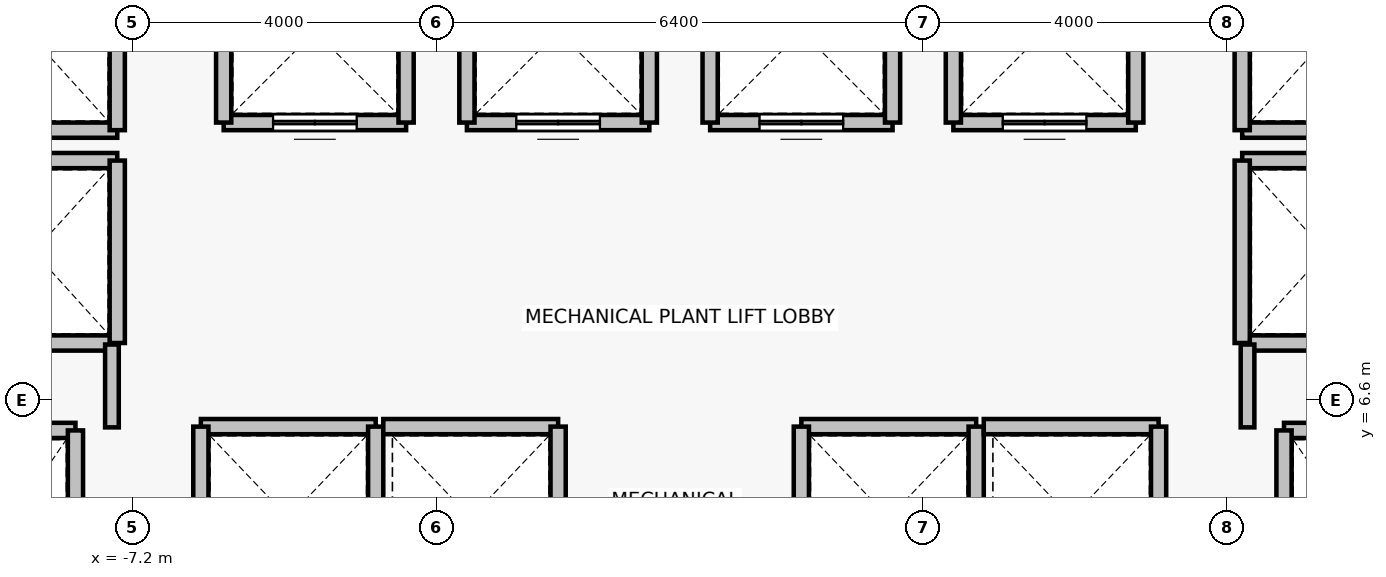
"""IFC4 building model, lengths in metres.
Left out: names, types, materials, properties, quantities, classifications, styles, units other than length and angle.
Written with IfcOpenShell. Run it as: python <this file> out.ifc"""

import sys

from ifc_helpers import new_model, si_unit, direction, frame, frame_2d, origin, place, context, subcontext, project, spatial, rectangle, extrude, source, transform, mapped, element, fill, save


model = new_model("IFC4")
c1 = context("Model", 3, precision=1e-05, world=origin(), true_north=direction((0.0, 1.0)))
c2 = subcontext(c1, "Body", "Model", "MODEL_VIEW")
j1 = project(units=[si_unit("LENGTHUNIT", "METRE"), si_unit("PLANEANGLEUNIT", "RADIAN")], contexts=[c1])
p1 = place(None, origin())
s1 = spatial("IfcSite", under=j1, at=p1, CompositionType="ELEMENT")
p2 = place(p1, origin())
s2 = spatial("IfcBuilding", under=s1, at=p2, CompositionType="ELEMENT")
p3 = place(p2, frame((0.0, 0.0, 80.2)))
s3 = spatial("IfcBuildingStorey", under=s2, at=p3, CompositionType="ELEMENT", Elevation=80.2)
p4 = place(p3, frame((-9.95, 6.2, 0.0), z_axis=(0.0, 0.0, 1.0), x_axis=(1.0, 0.0, 0.0)))
e1 = element("IfcWall", 1, at=p4, inside=s3, PredefinedType="SOLIDWALL", context=c2, shape_type="SweptSolid", body=[
    extrude(rectangle(XDim=2.0, YDim=0.2, at=frame_2d((1.0, 0.0))), origin(), (0.0, 0.0, 1.0), 6.35),
])
p5 = place(p3, frame((-7.95, 6.2, 0.0), z_axis=(0.0, 0.0, 1.0), x_axis=(0.0, -1.0, 0.0)))
e2 = element("IfcWall", 2, at=p5, inside=s3, PredefinedType="SOLIDWALL", context=c2, shape_type="SweptSolid", body=[
    extrude(rectangle(XDim=2.8, YDim=0.2, at=frame_2d((1.4, 0.0))), origin(), (0.0, 0.0, 1.0), 6.35),
])
p6 = place(p3, frame((7.95, 6.2, 0.0), z_axis=(0.0, 0.0, 1.0), x_axis=(1.0, 0.0, 0.0)))
e3 = element("IfcWall", 3, at=p6, inside=s3, PredefinedType="SOLIDWALL", context=c2, shape_type="SweptSolid", body=[
    extrude(rectangle(XDim=2.0, YDim=0.2, at=frame_2d((1.0, 0.0))), origin(), (0.0, 0.0, 1.0), 6.35),
])
p7 = place(p3, frame((7.95, 3.4, 0.0), z_axis=(0.0, 0.0, 1.0), x_axis=(0.0, 1.0, 0.0)))
e4 = element("IfcWall", 4, at=p7, inside=s3, PredefinedType="SOLIDWALL", context=c2, shape_type="SweptSolid", body=[
    extrude(rectangle(XDim=2.8, YDim=0.2, at=frame_2d((1.4, 0.0))), origin(), (0.0, 0.0, 1.0), 6.35),
])
p8 = place(p3, frame((-3.6, 10.25, 0.0), z_axis=(0.0, 0.0, 1.0), x_axis=(-1.0, 0.0, 0.0)))
e5 = element("IfcWall", 5, at=p8, inside=s3, PredefinedType="SOLIDWALL", context=c2, shape_type="SweptSolid", body=[
    extrude(rectangle(XDim=2.4, YDim=0.2, at=frame_2d((1.2, 0.0))), origin(), (0.0, 0.0, 1.0), 5.89),
])
p9 = place(p8, frame((0.65, 0.0, 0.0)))
e6 = element("IfcOpeningElement", 6, at=p9, cuts=e5, PredefinedType="OPENING", context=c2, shape_type="SweptSolid", body=[
    extrude(rectangle(XDim=1.1, YDim=2.2, at=frame_2d((0.55, 1.1))), frame((0.0, 0.11, 0.0), z_axis=(0.0, -1.0, 0.0), x_axis=(1.0, 0.0, 0.0)), (0.0, 0.0, 1.0), 0.22),
])
for number, where, z_axis, x_axis in (
    (7, (-6.0, 10.25, 0.0), (0.0, 0.0, 1.0), (0.0, 1.0, 0.0)),
    (8, (-3.6, 12.65, 0.0), (0.0, 0.0, 1.0), (0.0, -1.0, 0.0)),
):
    element("IfcWall", number, at=place(p3, frame(where, z_axis=z_axis, x_axis=x_axis)), inside=s3, PredefinedType="SOLIDWALL", context=c2, shape_type="SweptSolid", body=[
        extrude(rectangle(XDim=2.4, YDim=0.2, at=frame_2d((1.2, 0.0))), origin(), (0.0, 0.0, 1.0), 6.35),
    ])
p10 = place(p3, frame((-0.4, 10.25, 0.0), z_axis=(0.0, 0.0, 1.0), x_axis=(-1.0, 0.0, 0.0)))
e9 = element("IfcWall", 9, at=p10, inside=s3, PredefinedType="SOLIDWALL", context=c2, shape_type="SweptSolid", body=[
    extrude(rectangle(XDim=2.4, YDim=0.2, at=frame_2d((1.2, 0.0))), origin(), (0.0, 0.0, 1.0), 6.35),
])
p11 = place(p10, frame((0.65, 0.0, 0.0)))
e10 = element("IfcOpeningElement", 10, at=p11, cuts=e9, PredefinedType="OPENING", context=c2, shape_type="SweptSolid", body=[
    extrude(rectangle(XDim=1.1, YDim=2.2, at=frame_2d((0.55, 1.1))), frame((0.0, 0.11, 0.0), z_axis=(0.0, -1.0, 0.0), x_axis=(1.0, 0.0, 0.0)), (0.0, 0.0, 1.0), 0.22),
])
for number, where, z_axis, x_axis in (
    (11, (-2.8, 10.25, 0.0), (0.0, 0.0, 1.0), (0.0, 1.0, 0.0)),
    (12, (-0.4, 12.65, 0.0), (0.0, 0.0, 1.0), (0.0, -1.0, 0.0)),
):
    element("IfcWall", number, at=place(p3, frame(where, z_axis=z_axis, x_axis=x_axis)), inside=s3, PredefinedType="SOLIDWALL", context=c2, shape_type="SweptSolid", body=[
        extrude(rectangle(XDim=2.4, YDim=0.2, at=frame_2d((1.2, 0.0))), origin(), (0.0, 0.0, 1.0), 6.35),
    ])
p12 = place(p3, frame((2.8, 10.25, 0.0), z_axis=(0.0, 0.0, 1.0), x_axis=(-1.0, 0.0, 0.0)))
e13 = element("IfcWall", 13, at=p12, inside=s3, PredefinedType="SOLIDWALL", context=c2, shape_type="SweptSolid", body=[
    extrude(rectangle(XDim=2.4, YDim=0.2, at=frame_2d((1.2, 0.0))), origin(), (0.0, 0.0, 1.0), 6.35),
])
p13 = place(p12, frame((0.65, 0.0, 0.0)))
e14 = element("IfcOpeningElement", 14, at=p13, cuts=e13, PredefinedType="OPENING", context=c2, shape_type="SweptSolid", body=[
    extrude(rectangle(XDim=1.1, YDim=2.2, at=frame_2d((0.55, 1.1))), frame((0.0, 0.11, 0.0), z_axis=(0.0, -1.0, 0.0), x_axis=(1.0, 0.0, 0.0)), (0.0, 0.0, 1.0), 0.22),
])
for number, where, z_axis, x_axis in (
    (15, (0.4, 10.25, 0.0), (0.0, 0.0, 1.0), (0.0, 1.0, 0.0)),
    (16, (2.8, 12.65, 0.0), (0.0, 0.0, 1.0), (0.0, -1.0, 0.0)),
):
    element("IfcWall", number, at=place(p3, frame(where, z_axis=z_axis, x_axis=x_axis)), inside=s3, PredefinedType="SOLIDWALL", context=c2, shape_type="SweptSolid", body=[
        extrude(rectangle(XDim=2.4, YDim=0.2, at=frame_2d((1.2, 0.0))), origin(), (0.0, 0.0, 1.0), 6.35),
    ])
p14 = place(p3, frame((6.0, 10.25, 0.0), z_axis=(0.0, 0.0, 1.0), x_axis=(-1.0, 0.0, 0.0)))
e17 = element("IfcWall", 17, at=p14, inside=s3, PredefinedType="SOLIDWALL", context=c2, shape_type="SweptSolid", body=[
    extrude(rectangle(XDim=2.4, YDim=0.2, at=frame_2d((1.2, 0.0))), origin(), (0.0, 0.0, 1.0), 5.89),
])
p15 = place(p14, frame((0.65, 0.0, 0.0)))
e18 = element("IfcOpeningElement", 18, at=p15, cuts=e17, PredefinedType="OPENING", context=c2, shape_type="SweptSolid", body=[
    extrude(rectangle(XDim=1.1, YDim=2.2, at=frame_2d((0.55, 1.1))), frame((0.0, 0.11, 0.0), z_axis=(0.0, -1.0, 0.0), x_axis=(1.0, 0.0, 0.0)), (0.0, 0.0, 1.0), 0.22),
])
for number, where, z_axis, x_axis in (
    (19, (3.6, 10.25, 0.0), (0.0, 0.0, 1.0), (0.0, 1.0, 0.0)),
    (20, (6.0, 12.65, 0.0), (0.0, 0.0, 1.0), (0.0, -1.0, 0.0)),
):
    element("IfcWall", number, at=place(p3, frame(where, z_axis=z_axis, x_axis=x_axis)), inside=s3, PredefinedType="SOLIDWALL", context=c2, shape_type="SweptSolid", body=[
        extrude(rectangle(XDim=2.4, YDim=0.2, at=frame_2d((1.2, 0.0))), origin(), (0.0, 0.0, 1.0), 6.35),
    ])
p16 = place(p3, frame((-6.3, 6.25, 0.0), z_axis=(0.0, 0.0, 1.0), x_axis=(1.0, 0.0, 0.0)))
e21 = element("IfcWall", 21, at=p16, inside=s3, PredefinedType="SOLIDWALL", context=c2, shape_type="SweptSolid", body=[
    extrude(rectangle(XDim=2.3, YDim=0.2, at=frame_2d((1.15, 0.0))), origin(), (0.0, 0.0, 1.0), 6.35),
])
for number, where, z_axis, x_axis in (
    (22, (-6.3, 3.85, 0.0), (0.0, 0.0, 1.0), (0.0, 1.0, 0.0)),
    (23, (-4.0, 6.25, 0.0), (0.0, 0.0, 1.0), (0.0, -1.0, 0.0)),
):
    element("IfcWall", number, at=place(p3, frame(where, z_axis=z_axis, x_axis=x_axis)), inside=s3, PredefinedType="SOLIDWALL", context=c2, shape_type="SweptSolid", body=[
        extrude(rectangle(XDim=2.4, YDim=0.2, at=frame_2d((1.2, 0.0))), origin(), (0.0, 0.0, 1.0), 6.35),
    ])
p17 = place(p3, frame((-3.9, 6.25, 0.0), z_axis=(0.0, 0.0, 1.0), x_axis=(1.0, 0.0, 0.0)))
e24 = element("IfcWall", 24, at=p17, inside=s3, PredefinedType="SOLIDWALL", context=c2, shape_type="SweptSolid", body=[
    extrude(rectangle(XDim=2.3, YDim=0.2, at=frame_2d((1.15, 0.0))), origin(), (0.0, 0.0, 1.0), 6.35),
])
p18 = place(p3, frame((-1.6, 6.25, 0.0), z_axis=(0.0, 0.0, 1.0), x_axis=(0.0, -1.0, 0.0)))
e25 = element("IfcWall", 25, at=p18, inside=s3, PredefinedType="SOLIDWALL", context=c2, shape_type="SweptSolid", body=[
    extrude(rectangle(XDim=2.4, YDim=0.2, at=frame_2d((1.2, 0.0))), origin(), (0.0, 0.0, 1.0), 6.35),
])
p19 = place(p3, frame((1.6, 6.25, 0.0), z_axis=(0.0, 0.0, 1.0), x_axis=(1.0, 0.0, 0.0)))
e26 = element("IfcWall", 26, at=p19, inside=s3, PredefinedType="SOLIDWALL", context=c2, shape_type="SweptSolid", body=[
    extrude(rectangle(XDim=2.3, YDim=0.2, at=frame_2d((1.15, 0.0))), origin(), (0.0, 0.0, 1.0), 6.35),
])
for number, where, z_axis, x_axis in (
    (27, (1.6, 3.85, 0.0), (0.0, 0.0, 1.0), (0.0, 1.0, 0.0)),
    (28, (3.9, 6.25, 0.0), (0.0, 0.0, 1.0), (0.0, -1.0, 0.0)),
):
    element("IfcWall", number, at=place(p3, frame(where, z_axis=z_axis, x_axis=x_axis)), inside=s3, PredefinedType="SOLIDWALL", context=c2, shape_type="SweptSolid", body=[
        extrude(rectangle(XDim=2.4, YDim=0.2, at=frame_2d((1.2, 0.0))), origin(), (0.0, 0.0, 1.0), 6.35),
    ])
p20 = place(p3, frame((4.0, 6.25, 0.0), z_axis=(0.0, 0.0, 1.0), x_axis=(1.0, 0.0, 0.0)))
e29 = element("IfcWall", 29, at=p20, inside=s3, PredefinedType="SOLIDWALL", context=c2, shape_type="SweptSolid", body=[
    extrude(rectangle(XDim=2.3, YDim=0.2, at=frame_2d((1.15, 0.0))), origin(), (0.0, 0.0, 1.0), 6.35),
])
p21 = place(p3, frame((6.3, 6.25, 0.0), z_axis=(0.0, 0.0, 1.0), x_axis=(0.0, -1.0, 0.0)))
e30 = element("IfcWall", 30, at=p21, inside=s3, PredefinedType="SOLIDWALL", context=c2, shape_type="SweptSolid", body=[
    extrude(rectangle(XDim=2.4, YDim=0.2, at=frame_2d((1.2, 0.0))), origin(), (0.0, 0.0, 1.0), 6.35),
])
for number, where, z_axis, x_axis in (
    (31, (-7.4, 7.35, 0.0), (0.0, 0.0, 1.0), (-1.0, 0.0, 0.0)),
    (32, (-9.6, 9.75, 0.0), (0.0, 0.0, 1.0), (1.0, 0.0, 0.0)),
):
    element("IfcWall", number, at=place(p3, frame(where, z_axis=z_axis, x_axis=x_axis)), inside=s3, PredefinedType="SOLIDWALL", context=c2, shape_type="SweptSolid", body=[
        extrude(rectangle(XDim=2.2, YDim=0.2, at=frame_2d((1.1, 0.0))), origin(), (0.0, 0.0, 1.0), 5.79),
    ])
p22 = place(p3, frame((-7.4, 9.75, 0.0), z_axis=(0.0, 0.0, 1.0), x_axis=(0.0, -1.0, 0.0)))
e33 = element("IfcWall", 33, at=p22, inside=s3, PredefinedType="SOLIDWALL", context=c2, shape_type="SweptSolid", body=[
    extrude(rectangle(XDim=2.4, YDim=0.2, at=frame_2d((1.2, 0.0))), origin(), (0.0, 0.0, 1.0), 5.79),
])
p23 = place(p3, frame((-7.4, 10.15, 0.0), z_axis=(0.0, 0.0, 1.0), x_axis=(-1.0, 0.0, 0.0)))
e34 = element("IfcWall", 34, at=p23, inside=s3, PredefinedType="SOLIDWALL", context=c2, shape_type="SweptSolid", body=[
    extrude(rectangle(XDim=2.2, YDim=0.2, at=frame_2d((1.1, 0.0))), origin(), (0.0, 0.0, 1.0), 5.79),
])
p24 = place(p3, frame((-7.4, 12.55, 0.0), z_axis=(0.0, 0.0, 1.0), x_axis=(0.0, -1.0, 0.0)))
e35 = element("IfcWall", 35, at=p24, inside=s3, PredefinedType="SOLIDWALL", context=c2, shape_type="SweptSolid", body=[
    extrude(rectangle(XDim=2.4, YDim=0.2, at=frame_2d((1.2, 0.0))), origin(), (0.0, 0.0, 1.0), 5.79),
])
for number, where, z_axis, x_axis in (
    (36, (9.6, 7.35, 0.0), (0.0, 0.0, 1.0), (-1.0, 0.0, 0.0)),
    (37, (7.4, 9.75, 0.0), (0.0, 0.0, 1.0), (1.0, 0.0, 0.0)),
):
    element("IfcWall", number, at=place(p3, frame(where, z_axis=z_axis, x_axis=x_axis)), inside=s3, PredefinedType="SOLIDWALL", context=c2, shape_type="SweptSolid", body=[
        extrude(rectangle(XDim=2.2, YDim=0.2, at=frame_2d((1.1, 0.0))), origin(), (0.0, 0.0, 1.0), 5.79),
    ])
p25 = place(p3, frame((7.4, 7.35, 0.0), z_axis=(0.0, 0.0, 1.0), x_axis=(0.0, 1.0, 0.0)))
e38 = element("IfcWall", 38, at=p25, inside=s3, PredefinedType="SOLIDWALL", context=c2, shape_type="SweptSolid", body=[
    extrude(rectangle(XDim=2.4, YDim=0.2, at=frame_2d((1.2, 0.0))), origin(), (0.0, 0.0, 1.0), 5.79),
])
p26 = place(p3, frame((9.6, 10.15, 0.0), z_axis=(0.0, 0.0, 1.0), x_axis=(-1.0, 0.0, 0.0)))
e39 = element("IfcWall", 39, at=p26, inside=s3, PredefinedType="SOLIDWALL", context=c2, shape_type="SweptSolid", body=[
    extrude(rectangle(XDim=2.2, YDim=0.2, at=frame_2d((1.1, 0.0))), origin(), (0.0, 0.0, 1.0), 5.79),
])
p27 = place(p3, frame((7.4, 10.15, 0.0), z_axis=(0.0, 0.0, 1.0), x_axis=(0.0, 1.0, 0.0)))
e40 = element("IfcWall", 40, at=p27, inside=s3, PredefinedType="SOLIDWALL", context=c2, shape_type="SweptSolid", body=[
    extrude(rectangle(XDim=2.4, YDim=0.2, at=frame_2d((1.2, 0.0))), origin(), (0.0, 0.0, 1.0), 5.79),
])
for number, where, z_axis, x_axis in (
    (41, (-7.47, 7.33, 0.0), (0.0, 0.0, 1.0), (0.0, -1.0, 0.0)),
    (42, (7.47, 6.24, 0.0), (0.0, 0.0, 1.0), (0.0, 1.0, 0.0)),
):
    element("IfcWall", number, at=place(p3, frame(where, z_axis=z_axis, x_axis=x_axis)), inside=s3, PredefinedType="PARTITIONING", context=c2, shape_type="SweptSolid", body=[
        extrude(rectangle(XDim=1.09, YDim=0.18, at=frame_2d((0.545, 0.0))), origin(), (0.0, 0.0, 1.0), 5.79),
    ])
m1 = source(origin(), c2, "Body", "SweptSolid", [
    extrude(rectangle(XDim=1.1, YDim=2.2, at=frame_2d((0.55, 1.1))), frame((0.0, 0.025, 0.0), z_axis=(0.0, -1.0, 0.0), x_axis=(1.0, 0.0, 0.0)), (0.0, 0.0, 1.0), 0.05),
])
p28 = place(p9, origin())
e43 = element("IfcDoor", 43, at=p28, inside=s3, OperationType="DOUBLE_DOOR_SLIDING", PredefinedType="DOOR", context=c2, shape_type="MappedRepresentation", body=[
    mapped(m1, transform((0.0, 0.0, 0.0), x_axis=(1.0, 0.0, 0.0), y_axis=(0.0, 1.0, 0.0), z_axis=(0.0, 0.0, 1.0), scale=1.0)),
])
fill(e6, e43)
p29 = place(p11, origin())
e44 = element("IfcDoor", 44, at=p29, inside=s3, OperationType="DOUBLE_DOOR_SLIDING", PredefinedType="DOOR", context=c2, shape_type="MappedRepresentation", body=[
    mapped(m1, transform((0.0, 0.0, 0.0), x_axis=(1.0, 0.0, 0.0), y_axis=(0.0, 1.0, 0.0), z_axis=(0.0, 0.0, 1.0), scale=1.0)),
])
fill(e10, e44)
p30 = place(p13, origin())
e45 = element("IfcDoor", 45, at=p30, inside=s3, OperationType="DOUBLE_DOOR_SLIDING", PredefinedType="DOOR", context=c2, shape_type="MappedRepresentation", body=[
    mapped(m1, transform((0.0, 0.0, 0.0), x_axis=(1.0, 0.0, 0.0), y_axis=(0.0, 1.0, 0.0), z_axis=(0.0, 0.0, 1.0), scale=1.0)),
])
fill(e14, e45)
p31 = place(p15, origin())
e46 = element("IfcDoor", 46, at=p31, inside=s3, OperationType="DOUBLE_DOOR_SLIDING", PredefinedType="DOOR", context=c2, shape_type="MappedRepresentation", body=[
    mapped(m1, transform((0.0, 0.0, 0.0), x_axis=(1.0, 0.0, 0.0), y_axis=(0.0, 1.0, 0.0), z_axis=(0.0, 0.0, 1.0), scale=1.0)),
])
fill(e18, e46)
save(model, sys.argv[1])
